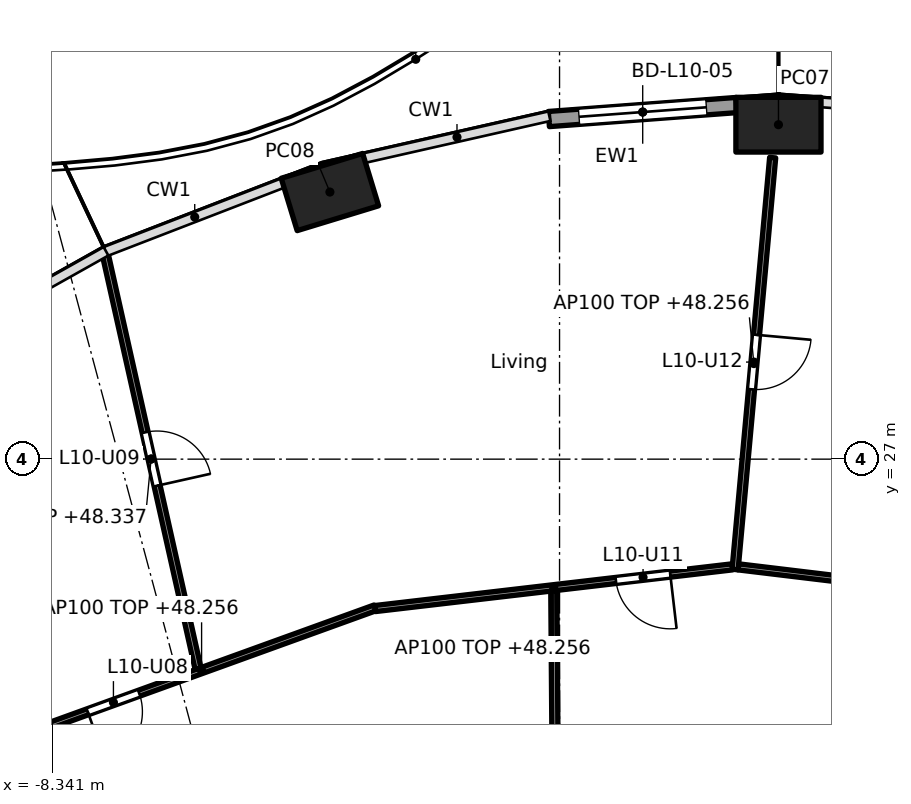
"""IFC4 building model, lengths in metres.
Left out: names, types, materials, properties, quantities, classifications, styles, units other than length and angle.
Written with IfcOpenShell. Run it as: python <this file> out.ifc"""

import sys

from ifc_helpers import new_model, si_unit, direction, frame, frame_2d, origin, origin_2d, place, context, subcontext, project, spatial, rectangle, hollow_rectangle, extrude, element, fill, save


model = new_model("IFC4")
c1 = context("Model", 3, precision=1e-05, world=origin(), true_north=direction((0.0, 1.0)))
c2 = subcontext(c1, "Body", "Model", "MODEL_VIEW")
j1 = project(units=[si_unit("LENGTHUNIT", "METRE"), si_unit("PLANEANGLEUNIT", "RADIAN")], contexts=[c1])
p1 = place(None, origin())
s1 = spatial("IfcSite", under=j1, at=p1, CompositionType="ELEMENT")
p2 = place(p1, origin())
s2 = spatial("IfcBuilding", under=s1, at=p2, CompositionType="ELEMENT")
p3 = place(p2, frame((0.0, 0.0, 45.5)))
s3 = spatial("IfcBuildingStorey", under=s2, at=p3, CompositionType="ELEMENT", Elevation=45.5)
for number, where, z_axis, x_axis in (
    (1, (3.6, 32.5, 0.0), (0.0, 0.0, 1.0), (-1.0, 0.0, 0.0)),
    (2, (-3.776, 31.393, 0.0), (0.0, 0.0, 1.0), (-0.957, -0.292, 0.0)),
):
    element("IfcColumn", number, at=place(p3, frame(where, z_axis=z_axis, x_axis=x_axis)), inside=s3, PredefinedType="COLUMN", context=c2, shape_type="SweptSolid", body=[
        extrude(hollow_rectangle(XDim=1.4, YDim=0.9, WallThickness=0.05, at=origin_2d()), origin(), (0.0, 0.0, 1.0), 3.7),
    ])
p4 = place(p3, frame((-0.176, 32.593, 0.0), z_axis=(0.0, 0.0, 1.0), x_axis=(0.997230834878, 0.074368420505, 0.0)))
e3 = element("IfcWall", 3, at=p4, inside=s3, PredefinedType="SOLIDWALL", context=c2, shape_type="SweptSolid", body=[
    extrude(rectangle(XDim=3.096, YDim=0.25, at=frame_2d((1.548, 0.0))), origin(), (0.0, 0.0, 1.0), 3.44),
])
p5 = place(p4, frame((0.498, 0.0, 0.0)))
e4 = element("IfcOpeningElement", 4, at=p5, cuts=e3, PredefinedType="OPENING", context=c2, shape_type="SweptSolid", body=[
    extrude(rectangle(XDim=2.1, YDim=2.4, at=frame_2d((1.05, 1.2))), frame((0.0, 0.135, 0.0), z_axis=(0.0, -1.0, 0.0), x_axis=(1.0, 0.0, 0.0)), (0.0, 0.0, 1.0), 0.27),
])
p6 = place(p3, frame((8.907, 24.51, 0.0), z_axis=(0.0, 0.0, 1.0), x_axis=(-0.992836798252, 0.119478416615, 0.0)))
e5 = element("IfcWall", 5, at=p6, inside=s3, PredefinedType="PARTITIONING", context=c2, shape_type="SweptSolid", body=[
    extrude(rectangle(XDim=6.01, YDim=0.1, at=frame_2d((3.005, 0.0))), origin(), (0.0, 0.0, 1.0), 2.756),
])
p7 = place(p3, frame((2.887, 25.185, 0.0), z_axis=(0.0, 0.0, 1.0), x_axis=(0.090885272046, 0.995861369531, 0.0)))
e6 = element("IfcWall", 6, at=p7, inside=s3, PredefinedType="PARTITIONING", context=c2, shape_type="SweptSolid", body=[
    extrude(rectangle(XDim=6.802, YDim=0.1, at=frame_2d((3.401, 0.0))), origin(), (0.0, 0.0, 1.0), 2.756),
])
p8 = place(p7, frame((2.976, 0.0, 0.0)))
e7 = element("IfcOpeningElement", 7, at=p8, cuts=e6, PredefinedType="OPENING", context=c2, shape_type="SweptSolid", body=[
    extrude(rectangle(XDim=0.9, YDim=2.1, at=frame_2d((0.45, 1.05))), frame((0.0, 0.06, 0.0), z_axis=(0.0, -1.0, 0.0), x_axis=(1.0, 0.0, 0.0)), (0.0, 0.0, 1.0), 0.12),
])
p9 = place(p3, frame((2.842, 25.229, 0.0), z_axis=(0.0, 0.0, 1.0), x_axis=(-0.993255612046, -0.115945198862, 0.0)))
e8 = element("IfcWall", 8, at=p9, inside=s3, PredefinedType="PARTITIONING", context=c2, shape_type="SweptSolid", body=[
    extrude(rectangle(XDim=5.913, YDim=0.1, at=frame_2d((2.956, 0.0))), origin(), (0.0, 0.0, 1.0), 2.756),
])
p10 = place(p9, frame((1.028, 0.0, 0.0)))
e9 = element("IfcOpeningElement", 9, at=p10, cuts=e8, PredefinedType="OPENING", context=c2, shape_type="SweptSolid", body=[
    extrude(rectangle(XDim=0.9, YDim=2.1, at=frame_2d((0.45, 1.05))), frame((0.0, 0.06, 0.0), z_axis=(0.0, -1.0, 0.0), x_axis=(1.0, 0.0, 0.0)), (0.0, 0.0, 1.0), 0.12),
])
p11 = place(p3, frame((-0.042, 17.98, 0.0), z_axis=(0.0, 0.0, 1.0), x_axis=(-0.007692080119, 0.999970415514, 0.0)))
e10 = element("IfcWall", 10, at=p11, inside=s3, PredefinedType="PARTITIONING", context=c2, shape_type="SweptSolid", body=[
    extrude(rectangle(XDim=6.856, YDim=0.1, at=frame_2d((3.428, 0.0))), origin(), (0.0, 0.0, 1.0), 3.44),
])
p12 = place(p3, frame((-3.034, 24.554, 0.0), z_axis=(0.0, 0.0, 1.0), x_axis=(-0.940401691072, -0.340065669288, 0.0)))
e11 = element("IfcWall", 11, at=p12, inside=s3, PredefinedType="PARTITIONING", context=c2, shape_type="SweptSolid", body=[
    extrude(rectangle(XDim=6.067, YDim=0.1, at=frame_2d((3.034, 0.0))), origin(), (0.0, 0.0, 1.0), 2.756),
])
p13 = place(p12, frame((4.125, 0.0, 0.0)))
e12 = element("IfcOpeningElement", 12, at=p13, cuts=e11, PredefinedType="OPENING", context=c2, shape_type="SweptSolid", body=[
    extrude(rectangle(XDim=0.9, YDim=2.1, at=frame_2d((0.45, 1.05))), frame((0.0, 0.06, 0.0), z_axis=(0.0, -1.0, 0.0), x_axis=(1.0, 0.0, 0.0)), (0.0, 0.0, 1.0), 0.12),
])
p14 = place(p3, frame((-5.945, 23.555, 0.0), z_axis=(0.0, 0.0, 1.0), x_axis=(-0.218598565433, 0.975814873421, 0.0)))
e13 = element("IfcWall", 13, at=p14, inside=s3, PredefinedType="PARTITIONING", context=c2, shape_type="SweptSolid", body=[
    extrude(rectangle(XDim=7.065, YDim=0.1, at=frame_2d((3.533, 0.0))), origin(), (0.0, 0.0, 1.0), 2.837),
])
p15 = place(p14, frame((3.083, 0.0, 0.0)))
e14 = element("IfcOpeningElement", 14, at=p15, cuts=e13, PredefinedType="OPENING", context=c2, shape_type="SweptSolid", body=[
    extrude(rectangle(XDim=0.9, YDim=2.1, at=frame_2d((0.45, 1.05))), frame((0.0, 0.06, 0.0), z_axis=(0.0, -1.0, 0.0), x_axis=(1.0, 0.0, 0.0)), (0.0, 0.0, 1.0), 0.12),
])
p16 = place(p5, origin())
e15 = element("IfcDoor", 15, at=p16, inside=s3, OperationType="SLIDING_TO_LEFT", PredefinedType="DOOR", context=c2, shape_type="SweptSolid", body=[
    extrude(rectangle(XDim=2.1, YDim=2.4, at=frame_2d((1.05, 1.2))), frame((0.0, 0.025, 0.0), z_axis=(0.0, -1.0, 0.0), x_axis=(1.0, 0.0, 0.0)), (0.0, 0.0, 1.0), 0.05),
])
fill(e4, e15)
p17 = place(p13, origin())
e16 = element("IfcDoor", 16, at=p17, inside=s3, OperationType="SINGLE_SWING_RIGHT", PredefinedType="DOOR", context=c2, shape_type="SweptSolid", body=[
    extrude(rectangle(XDim=0.9, YDim=2.1, at=frame_2d((0.45, 1.05))), frame((0.0, 0.025, 0.0), z_axis=(0.0, -1.0, 0.0), x_axis=(1.0, 0.0, 0.0)), (0.0, 0.0, 1.0), 0.05),
])
fill(e12, e16)
p18 = place(p15, frame((0.9, 0.0, 0.0), x_axis=(-1.0, 0.0, 0.0)))
e17 = element("IfcDoor", 17, at=p18, inside=s3, OperationType="SINGLE_SWING_RIGHT", PredefinedType="DOOR", context=c2, shape_type="SweptSolid", body=[
    extrude(rectangle(XDim=0.9, YDim=2.1, at=frame_2d((0.45, 1.05))), frame((0.0, 0.025, 0.0), z_axis=(0.0, -1.0, 0.0), x_axis=(1.0, 0.0, 0.0)), (0.0, 0.0, 1.0), 0.05),
])
fill(e14, e17)
p19 = place(p10, origin())
e18 = element("IfcDoor", 18, at=p19, inside=s3, OperationType="SINGLE_SWING_LEFT", PredefinedType="DOOR", context=c2, shape_type="SweptSolid", body=[
    extrude(rectangle(XDim=0.9, YDim=2.1, at=frame_2d((0.45, 1.05))), frame((0.0, 0.025, 0.0), z_axis=(0.0, -1.0, 0.0), x_axis=(1.0, 0.0, 0.0)), (0.0, 0.0, 1.0), 0.05),
])
fill(e9, e18)
p20 = place(p8, frame((0.9, 0.0, 0.0), x_axis=(-1.0, 0.0, 0.0)))
e19 = element("IfcDoor", 19, at=p20, inside=s3, OperationType="SINGLE_SWING_LEFT", PredefinedType="DOOR", context=c2, shape_type="SweptSolid", body=[
    extrude(rectangle(XDim=0.9, YDim=2.1, at=frame_2d((0.45, 1.05))), frame((0.0, 0.025, 0.0), z_axis=(0.0, -1.0, 0.0), x_axis=(1.0, 0.0, 0.0)), (0.0, 0.0, 1.0), 0.05),
])
fill(e7, e19)
save(model, sys.argv[1])
